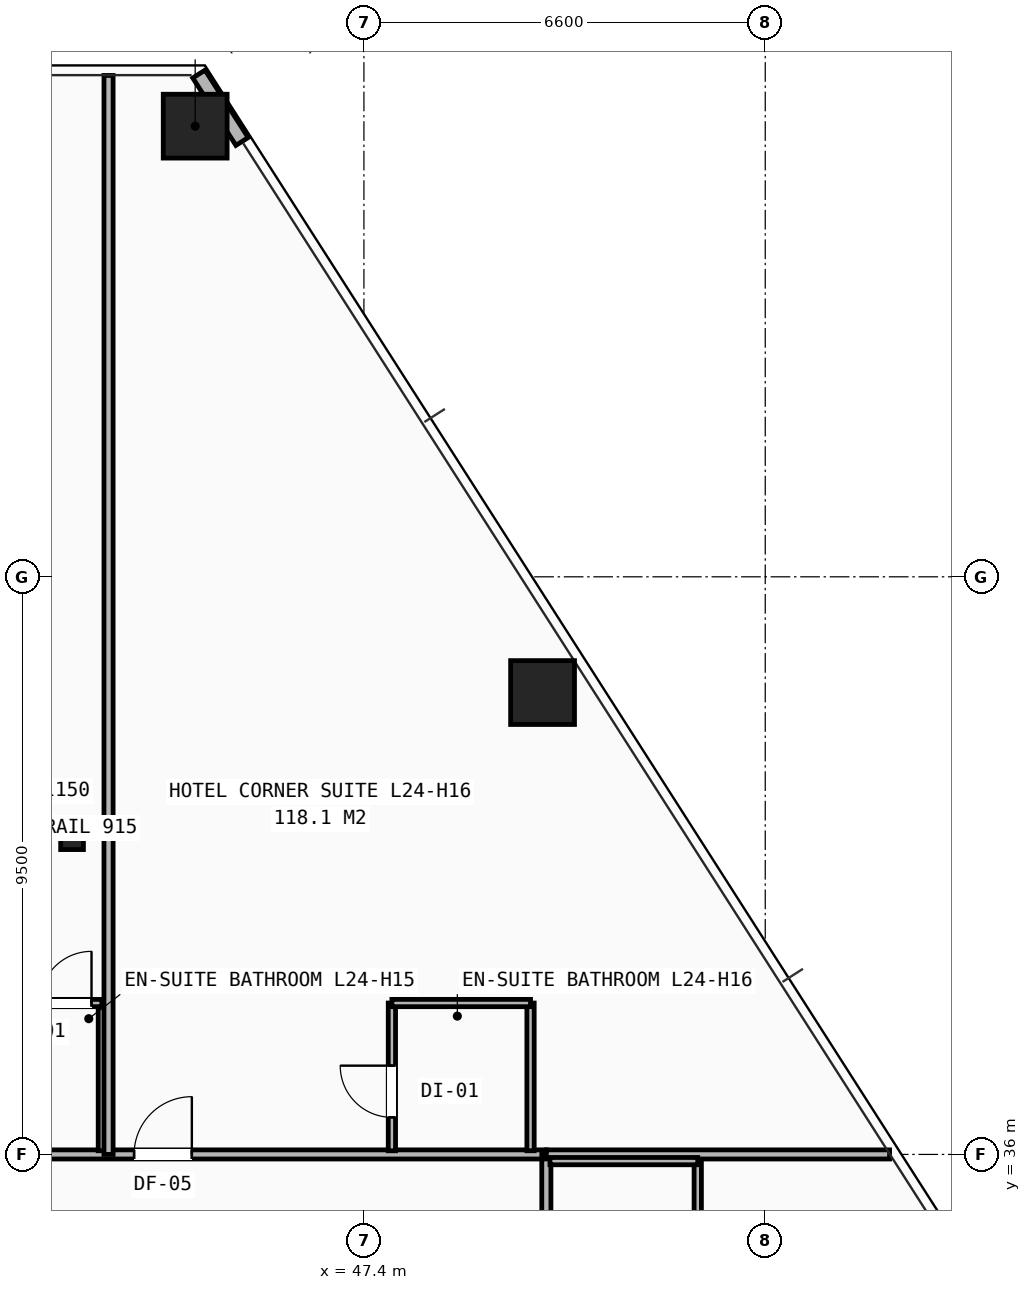
"""IFC4 building model, lengths in metres.
Left out: names, types, materials, properties, quantities, classifications, styles, units other than length and angle.
Written with IfcOpenShell. Run it as: python <this file> out.ifc"""

import sys

from ifc_helpers import new_model, si_unit, direction, frame, frame_2d, origin, origin_2d, place, context, subcontext, project, spatial, rectangle, hollow_rectangle, i_section, extrude, element, fill, save


model = new_model("IFC4")
c1 = context("Model", 3, precision=1e-05, world=origin(), true_north=direction((0.0, 1.0)))
c2 = subcontext(c1, "Body", "Model", "MODEL_VIEW")
j1 = project(units=[si_unit("LENGTHUNIT", "METRE"), si_unit("PLANEANGLEUNIT", "RADIAN")], contexts=[c1])
p1 = place(None, origin())
s1 = spatial("IfcSite", under=j1, at=p1, CompositionType="ELEMENT")
p2 = place(p1, origin())
s2 = spatial("IfcBuilding", under=s1, at=p2, CompositionType="ELEMENT")
p3 = place(p2, frame((0.0, 0.0, 86.2)))
s3 = spatial("IfcBuildingStorey", under=s2, at=p3, CompositionType="ELEMENT", Elevation=86.2)
p4 = place(p3, frame((42.6, 41.2, 0.0), z_axis=(0.0, 0.0, 1.0), x_axis=(1.0, 0.0, 0.0)))
e1 = element("IfcColumn", 1, at=p4, inside=s3, PredefinedType="COLUMN", context=c2, shape_type="SweptSolid", body=[
    extrude(i_section(OverallWidth=0.374, OverallDepth=0.372, WebThickness=0.016, FlangeThickness=0.026, at=origin_2d()), origin(), (0.0, 0.0, 1.0), 3.2),
])
for number, where, z_axis, x_axis in (
    (2, (44.625, 52.912, 0.0), (0.0, 0.0, 1.0), (1.0, 0.0, 0.0)),
    (3, (50.338, 43.596, 0.0), (0.0, 0.0, 1.0), (1.0, 0.0, 0.0)),
):
    element("IfcColumn", number, at=place(p3, frame(where, z_axis=z_axis, x_axis=x_axis)), inside=s3, PredefinedType="COLUMN", context=c2, shape_type="SweptSolid", body=[
        extrude(hollow_rectangle(XDim=1.05, YDim=1.05, WallThickness=0.07, at=origin_2d()), origin(), (0.0, 0.0, 1.0), 3.2),
    ])
p5 = place(p3, frame((45.396, 52.66, 0.0), z_axis=(0.0, 0.0, 1.0), x_axis=(-0.538937912301, 0.842345491283, 0.0)))
e4 = element("IfcWall", 4, at=p5, inside=s3, PredefinedType="SHEAR", context=c2, shape_type="SweptSolid", body=[
    extrude(rectangle(XDim=1.316, YDim=0.24, at=frame_2d((0.658, 0.0))), origin(), (0.0, 0.0, 1.0), 2.253),
])
p6 = place(p3, frame((40.75, 36.0, 0.0), z_axis=(0.0, 0.0, 1.0), x_axis=(1.0, 0.0, 0.0)))
e5 = element("IfcWall", 5, at=p6, inside=s3, PredefinedType="PARTITIONING", context=c2, shape_type="SweptSolid", body=[
    extrude(rectangle(XDim=9.65, YDim=0.15, at=frame_2d((4.825, 0.0))), origin(), (0.0, 0.0, 1.0), 2.503),
])
p7 = place(p6, frame((2.87, 0.0, 0.0)))
e6 = element("IfcOpeningElement", 6, at=p7, cuts=e5, PredefinedType="OPENING", context=c2, shape_type="SweptSolid", body=[
    extrude(rectangle(XDim=0.95, YDim=2.1, at=frame_2d((0.475, 1.05))), frame((0.0, 0.085, 0.0), z_axis=(0.0, -1.0, 0.0), x_axis=(1.0, 0.0, 0.0)), (0.0, 0.0, 1.0), 0.17),
])
p8 = place(p3, frame((50.4, 14.1, 0.0), z_axis=(0.0, 0.0, 1.0), x_axis=(0.0, 1.0, 0.0)))
e7 = element("IfcWall", 7, at=p8, inside=s3, PredefinedType="PARTITIONING", context=c2, shape_type="SweptSolid", body=[
    extrude(rectangle(XDim=21.9, YDim=0.15, at=frame_2d((10.95, 0.0))), origin(), (0.0, 0.0, 1.0), 2.421),
])
p9 = place(p8, frame((0.42, 0.0, 0.0)))
e8 = element("IfcOpeningElement", 8, at=p9, cuts=e7, PredefinedType="OPENING", context=c2, shape_type="SweptSolid", body=[
    extrude(rectangle(XDim=0.95, YDim=2.1, at=frame_2d((0.475, 1.05))), frame((0.0, 0.085, 0.0), z_axis=(0.0, -1.0, 0.0), x_axis=(1.0, 0.0, 0.0)), (0.0, 0.0, 1.0), 0.17),
])
p10 = place(p8, frame((4.72, 0.0, 0.0)))
e9 = element("IfcOpeningElement", 9, at=p10, cuts=e7, PredefinedType="OPENING", context=c2, shape_type="SweptSolid", body=[
    extrude(rectangle(XDim=0.95, YDim=2.1, at=frame_2d((0.475, 1.05))), frame((0.0, 0.085, 0.0), z_axis=(0.0, -1.0, 0.0), x_axis=(1.0, 0.0, 0.0)), (0.0, 0.0, 1.0), 0.17),
])
p11 = place(p8, frame((9.12, 0.0, 0.0)))
e10 = element("IfcOpeningElement", 10, at=p11, cuts=e7, PredefinedType="OPENING", context=c2, shape_type="SweptSolid", body=[
    extrude(rectangle(XDim=0.95, YDim=2.1, at=frame_2d((0.475, 1.05))), frame((0.0, 0.085, 0.0), z_axis=(0.0, -1.0, 0.0), x_axis=(1.0, 0.0, 0.0)), (0.0, 0.0, 1.0), 0.17),
])
p12 = place(p8, frame((13.72, 0.0, 0.0)))
e11 = element("IfcOpeningElement", 11, at=p12, cuts=e7, PredefinedType="OPENING", context=c2, shape_type="SweptSolid", body=[
    extrude(rectangle(XDim=0.95, YDim=2.1, at=frame_2d((0.475, 1.05))), frame((0.0, 0.085, 0.0), z_axis=(0.0, -1.0, 0.0), x_axis=(1.0, 0.0, 0.0)), (0.0, 0.0, 1.0), 0.17),
])
p13 = place(p8, frame((18.12, 0.0, 0.0)))
e12 = element("IfcOpeningElement", 12, at=p13, cuts=e7, PredefinedType="OPENING", context=c2, shape_type="SweptSolid", body=[
    extrude(rectangle(XDim=0.95, YDim=2.1, at=frame_2d((0.475, 1.05))), frame((0.0, 0.085, 0.0), z_axis=(0.0, -1.0, 0.0), x_axis=(1.0, 0.0, 0.0)), (0.0, 0.0, 1.0), 0.17),
])
p14 = place(p3, frame((50.4, 36.0, 0.0), z_axis=(0.0, 0.0, 1.0), x_axis=(1.0, 0.0, 0.0)))
e13 = element("IfcWall", 13, at=p14, inside=s3, PredefinedType="PARTITIONING", context=c2, shape_type="SweptSolid", body=[
    extrude(rectangle(XDim=5.645, YDim=0.15, at=frame_2d((2.823, 0.0))), origin(), (0.0, 0.0, 1.0), 2.258),
])
p15 = place(p3, frame((52.89, 33.61, 0.0), z_axis=(0.0, 0.0, 1.0), x_axis=(0.0, 1.0, 0.0)))
e14 = element("IfcWall", 14, at=p15, inside=s3, PredefinedType="PARTITIONING", context=c2, shape_type="SweptSolid", body=[
    extrude(rectangle(XDim=2.28, YDim=0.12, at=frame_2d((1.14, 0.0))), origin(), (0.0, 0.0, 1.0), 2.97),
])
for number, where, z_axis, x_axis in (
    (15, (50.46, 35.89, 0.0), (0.0, 0.0, 1.0), (1.0, 0.0, 0.0)),
    (16, (43.09, 36.06, 0.0), (0.0, 0.0, 1.0), (0.0, 1.0, 0.0)),
):
    element("IfcWall", number, at=place(p3, frame(where, z_axis=z_axis, x_axis=x_axis)), inside=s3, PredefinedType="PARTITIONING", context=c2, shape_type="SweptSolid", body=[
        extrude(rectangle(XDim=2.43, YDim=0.12, at=frame_2d((1.215, 0.0))), origin(), (0.0, 0.0, 1.0), 2.97),
    ])
p16 = place(p3, frame((41.95, 38.49, 0.0), z_axis=(0.0, 0.0, 1.0), x_axis=(1.0, 0.0, 0.0)))
e17 = element("IfcWall", 17, at=p16, inside=s3, PredefinedType="PARTITIONING", context=c2, shape_type="SweptSolid", body=[
    extrude(rectangle(XDim=1.14, YDim=0.12, at=frame_2d((0.57, 0.0))), origin(), (0.0, 0.0, 1.0), 2.97),
])
p17 = place(p16, frame((0.12, 0.0, 0.0)))
e18 = element("IfcOpeningElement", 18, at=p17, cuts=e17, PredefinedType="OPENING", context=c2, shape_type="SweptSolid", body=[
    extrude(rectangle(XDim=0.85, YDim=2.05, at=frame_2d((0.425, 1.025))), frame((0.0, 0.07, 0.0), z_axis=(0.0, -1.0, 0.0), x_axis=(1.0, 0.0, 0.0)), (0.0, 0.0, 1.0), 0.14),
])
p18 = place(p3, frame((43.2, 36.0, 0.0), z_axis=(0.0, 0.0, 1.0), x_axis=(0.0, 1.0, 0.0)))
e19 = element("IfcWall", 19, at=p18, inside=s3, PredefinedType="PARTITIONING", context=c2, shape_type="SweptSolid", body=[
    extrude(rectangle(XDim=17.746, YDim=0.15, at=frame_2d((8.873, 0.0))), origin(), (0.0, 0.0, 1.0), 2.258),
])
p19 = place(p3, frame((47.86, 36.06, 0.0), z_axis=(0.0, 0.0, 1.0), x_axis=(0.0, 1.0, 0.0)))
e20 = element("IfcWall", 20, at=p19, inside=s3, PredefinedType="PARTITIONING", context=c2, shape_type="SweptSolid", body=[
    extrude(rectangle(XDim=2.43, YDim=0.12, at=frame_2d((1.215, 0.0))), origin(), (0.0, 0.0, 1.0), 2.503),
])
p20 = place(p19, frame((0.55, 0.0, 0.0)))
e21 = element("IfcOpeningElement", 21, at=p20, cuts=e20, PredefinedType="OPENING", context=c2, shape_type="SweptSolid", body=[
    extrude(rectangle(XDim=0.85, YDim=2.05, at=frame_2d((0.425, 1.025))), frame((0.0, 0.07, 0.0), z_axis=(0.0, -1.0, 0.0), x_axis=(1.0, 0.0, 0.0)), (0.0, 0.0, 1.0), 0.14),
])
p21 = place(p3, frame((50.14, 36.06, 0.0), z_axis=(0.0, 0.0, 1.0), x_axis=(0.0, 1.0, 0.0)))
e22 = element("IfcWall", 22, at=p21, inside=s3, PredefinedType="PARTITIONING", context=c2, shape_type="SweptSolid", body=[
    extrude(rectangle(XDim=2.43, YDim=0.12, at=frame_2d((1.215, 0.0))), origin(), (0.0, 0.0, 1.0), 2.97),
])
p22 = place(p3, frame((47.86, 38.49, 0.0), z_axis=(0.0, 0.0, 1.0), x_axis=(1.0, 0.0, 0.0)))
e23 = element("IfcWall", 23, at=p22, inside=s3, PredefinedType="PARTITIONING", context=c2, shape_type="SweptSolid", body=[
    extrude(rectangle(XDim=2.28, YDim=0.12, at=frame_2d((1.14, 0.0))), origin(), (0.0, 0.0, 1.0), 2.503),
])
p23 = place(p17, origin())
e24 = element("IfcDoor", 24, at=p23, inside=s3, OperationType="SINGLE_SWING_RIGHT", PredefinedType="DOOR", context=c2, shape_type="SweptSolid", body=[
    extrude(rectangle(XDim=0.85, YDim=2.05, at=frame_2d((0.425, 1.025))), frame((0.0, 0.025, 0.0), z_axis=(0.0, -1.0, 0.0), x_axis=(1.0, 0.0, 0.0)), (0.0, 0.0, 1.0), 0.05),
])
fill(e18, e24)
p24 = place(p7, origin())
e25 = element("IfcDoor", 25, at=p24, inside=s3, OperationType="SINGLE_SWING_RIGHT", PredefinedType="DOOR", context=c2, shape_type="SweptSolid", body=[
    extrude(rectangle(XDim=0.95, YDim=2.1, at=frame_2d((0.475, 1.05))), frame((0.0, 0.025, 0.0), z_axis=(0.0, -1.0, 0.0), x_axis=(1.0, 0.0, 0.0)), (0.0, 0.0, 1.0), 0.05),
])
fill(e6, e25)
p25 = place(p20, origin())
e26 = element("IfcDoor", 26, at=p25, inside=s3, OperationType="SINGLE_SWING_RIGHT", PredefinedType="DOOR", context=c2, shape_type="SweptSolid", body=[
    extrude(rectangle(XDim=0.85, YDim=2.05, at=frame_2d((0.425, 1.025))), frame((0.0, 0.025, 0.0), z_axis=(0.0, -1.0, 0.0), x_axis=(1.0, 0.0, 0.0)), (0.0, 0.0, 1.0), 0.05),
])
fill(e21, e26)
save(model, sys.argv[1])
